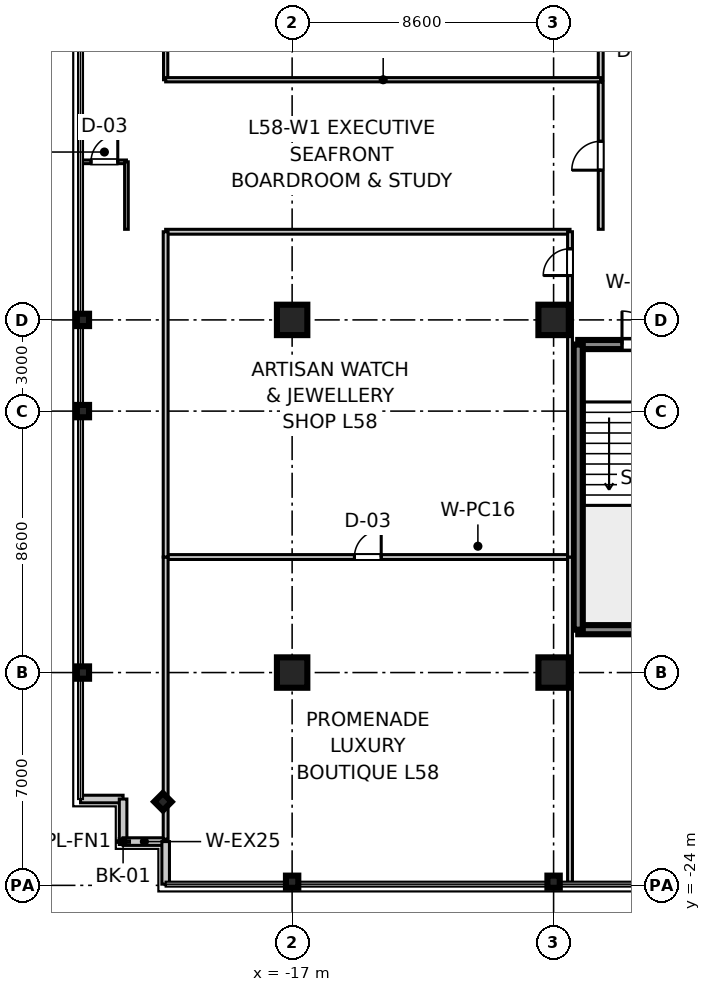
"""IFC4 building model, lengths in metres.
Left out: names, types, materials, properties, quantities, classifications, styles, units other than length and angle.
Written with IfcOpenShell. Run it as: python <this file> out.ifc"""

import sys

from ifc_helpers import new_model, si_unit, direction, frame, frame_2d, origin, origin_2d, place, context, subcontext, project, spatial, rectangle, i_section, extrude, source, transform, mapped, element, fill, save


model = new_model("IFC4")
c1 = context("Model", 3, precision=1e-05, world=origin(), true_north=direction((0.0, 1.0)))
c2 = subcontext(c1, "Body", "Model", "MODEL_VIEW")
j1 = project(units=[si_unit("LENGTHUNIT", "METRE"), si_unit("PLANEANGLEUNIT", "RADIAN")], contexts=[c1])
p1 = place(None, origin())
s1 = spatial("IfcSite", under=j1, at=p1, CompositionType="ELEMENT")
p2 = place(p1, origin())
s2 = spatial("IfcBuilding", under=s1, at=p2, CompositionType="ELEMENT")
p3 = place(p2, frame((0.0, 0.0, 227.1)))
s3 = spatial("IfcBuildingStorey", under=s2, at=p3, CompositionType="ELEMENT", Elevation=227.1)
m1 = source(origin(), c2, "Body", "SweptSolid", [
    extrude(rectangle(XDim=1.0, YDim=1.0, at=origin_2d()), origin(), (0.0, 0.0, 1.0), 3.655),
])
for number, where, z_axis, x_axis in (
    (1, (-17.0, -17.0, 0.0), (0.0, 0.0, 1.0), (1.0, 0.0, 0.0)),
    (2, (-17.0, -5.4, 0.0), (0.0, 0.0, 1.0), (1.0, 0.0, 0.0)),
    (3, (-8.4, -17.0, 0.0), (0.0, 0.0, 1.0), (1.0, 0.0, 0.0)),
    (4, (-8.4, -5.4, 0.0), (0.0, 0.0, 1.0), (1.0, 0.0, 0.0)),
):
    element("IfcColumn", number, at=place(p3, frame(where, z_axis=z_axis, x_axis=x_axis)), inside=s3, PredefinedType="COLUMN", context=c2, shape_type="MappedRepresentation", body=[
        mapped(m1, transform((0.0, 0.0, 0.0), scale=1.0)),
    ])
m2 = source(origin(), c2, "Body", "SweptSolid", [
    extrude(i_section(OverallWidth=0.401, OverallDepth=0.406, WebThickness=0.016, FlangeThickness=0.025, at=origin_2d()), origin(), (0.0, 0.0, 1.0), 3.655),
])
for number, where, z_axis, x_axis in (
    (5, (-23.88, -17.0, 0.0), (0.0, 0.0, 1.0), (1.0, 0.0, 0.0)),
    (6, (-23.88, -8.4, 0.0), (0.0, 0.0, 1.0), (1.0, 0.0, 0.0)),
    (7, (-23.88, -5.4, 0.0), (0.0, 0.0, 1.0), (1.0, 0.0, 0.0)),
    (8, (-17.0, -23.88, 0.0), (0.0, 0.0, 1.0), (0.0, 1.0, 0.0)),
    (9, (-8.4, -23.88, 0.0), (0.0, 0.0, 1.0), (0.0, 1.0, 0.0)),
    (10, (-21.25, -21.25, 0.0), (0.0, 0.0, 1.0), (0.707, 0.707, 0.0)),
):
    element("IfcColumn", number, at=place(p3, frame(where, z_axis=z_axis, x_axis=x_axis)), inside=s3, PredefinedType="COLUMN", context=c2, shape_type="MappedRepresentation", body=[
        mapped(m2, transform((0.0, 0.0, 0.0), scale=1.0)),
    ])
m3 = source(origin(), c2, "Body", "SweptSolid", [
    extrude(rectangle(XDim=3.98, YDim=0.3, at=frame_2d((1.99, 0.0))), origin(), (0.0, 0.0, 1.0), 3.41),
])
p4 = place(p3, frame((-7.59, -15.59, 0.0), z_axis=(0.0, 0.0, 1.0), x_axis=(1.0, 0.0, 0.0)))
e11 = element("IfcWall", 11, at=p4, inside=s3, PredefinedType="SHEAR", context=c2, shape_type="MappedRepresentation", body=[
    mapped(m3, transform((0.0, 0.0, 0.0), scale=1.0)),
])
p5 = place(p3, frame((-7.59, -6.21, 0.0), z_axis=(0.0, 0.0, 1.0), x_axis=(1.0, 0.0, 0.0)))
e12 = element("IfcWall", 12, at=p5, inside=s3, PredefinedType="SHEAR", context=c2, shape_type="MappedRepresentation", body=[
    mapped(m3, transform((0.0, 0.0, 0.0), scale=1.0)),
])
p6 = place(p5, frame((1.44, 0.0, 0.0)))
e13 = element("IfcOpeningElement", 13, at=p6, cuts=e12, PredefinedType="OPENING", context=c2, shape_type="SweptSolid", body=[
    extrude(rectangle(XDim=1.1, YDim=2.15, at=frame_2d((0.55, 1.075))), frame((0.0, 0.16, 0.0), z_axis=(0.0, -1.0, 0.0), x_axis=(1.0, 0.0, 0.0)), (0.0, 0.0, 1.0), 0.32),
])
m4 = source(origin(), c2, "Body", "SweptSolid", [
    extrude(rectangle(XDim=9.38, YDim=0.3, at=frame_2d((4.69, 0.0))), origin(), (0.0, 0.0, 1.0), 3.41),
])
p7 = place(p3, frame((-7.59, -15.59, 0.0), z_axis=(0.0, 0.0, 1.0), x_axis=(0.0, 1.0, 0.0)))
e14 = element("IfcWall", 14, at=p7, inside=s3, PredefinedType="SHEAR", context=c2, shape_type="MappedRepresentation", body=[
    mapped(m4, transform((0.0, 0.0, 0.0), scale=1.0)),
])
m5 = source(origin(), c2, "Body", "SweptSolid", [
    extrude(rectangle(XDim=1.4, YDim=0.25, at=frame_2d((0.7, 0.0))), origin(), (0.0, 0.0, 1.0), 3.41),
])
p8 = place(p3, frame((-23.96, -21.16, 0.0), z_axis=(0.0, 0.0, 1.0), x_axis=(1.0, 0.0, 0.0)))
e15 = element("IfcWall", 15, at=p8, inside=s3, PredefinedType="STANDARD", context=c2, shape_type="MappedRepresentation", body=[
    mapped(m5, transform((0.0, 0.0, 0.0), scale=1.0)),
])
m6 = source(origin(), c2, "Body", "SweptSolid", [
    extrude(rectangle(XDim=1.4, YDim=0.25, at=frame_2d((0.7, 0.0))), origin(), (0.0, 0.0, 1.0), 3.41),
])
for number, where, z_axis, x_axis in (
    (16, (-22.56, -22.56, 0.0), (0.0, 0.0, 1.0), (0.0, 1.0, 0.0)),
    (17, (-22.56, -22.56, 0.0), (0.0, 0.0, 1.0), (1.0, 0.0, 0.0)),
):
    element("IfcWall", number, at=place(p3, frame(where, z_axis=z_axis, x_axis=x_axis)), inside=s3, PredefinedType="STANDARD", context=c2, shape_type="MappedRepresentation", body=[
        mapped(m6, transform((0.0, 0.0, 0.0), scale=1.0)),
    ])
p9 = place(p3, frame((-21.16, -23.96, 0.0), z_axis=(0.0, 0.0, 1.0), x_axis=(0.0, 1.0, 0.0)))
e18 = element("IfcWall", 18, at=p9, inside=s3, PredefinedType="STANDARD", context=c2, shape_type="MappedRepresentation", body=[
    mapped(m5, transform((0.0, 0.0, 0.0), scale=1.0)),
])
m7 = source(origin(), c2, "Body", "SweptSolid", [
    extrude(rectangle(XDim=21.4, YDim=0.16, at=frame_2d((10.7, 0.0))), origin(), (0.0, 0.0, 1.0), 2.75),
])
p10 = place(p3, frame((-6.85, 2.5, 0.0), z_axis=(0.0, 0.0, 1.0), x_axis=(0.0, 1.0, 0.0)))
e19 = element("IfcWall", 19, at=p10, inside=s3, PredefinedType="PARTITIONING", context=c2, shape_type="MappedRepresentation", body=[
    mapped(m7, transform((0.0, 0.0, 0.0), scale=1.0)),
])
p11 = place(p10, frame((8.15, 0.0, 0.0)))
e20 = element("IfcOpeningElement", 20, at=p11, cuts=e19, PredefinedType="OPENING", context=c2, shape_type="SweptSolid", body=[
    extrude(rectangle(XDim=0.95, YDim=2.1, at=frame_2d((0.475, 1.05))), frame((0.0, 0.09, 0.0), z_axis=(0.0, -1.0, 0.0), x_axis=(1.0, 0.0, 0.0)), (0.0, 0.0, 1.0), 0.18),
])
m8 = source(origin(), c2, "Body", "SweptSolid", [
    extrude(rectangle(XDim=19.98, YDim=0.14, at=frame_2d((9.99, 0.0))), origin(), (0.0, 0.0, 1.0), 2.75),
])
p12 = place(p3, frame((-21.16, 2.5, 0.0), z_axis=(0.0, 0.0, 1.0), x_axis=(0.0, 1.0, 0.0)))
e21 = element("IfcWall", 21, at=p12, inside=s3, PredefinedType="PARTITIONING", context=c2, shape_type="MappedRepresentation", body=[
    mapped(m8, transform((0.0, 0.0, 0.0), scale=1.0)),
])
m9 = source(origin(), c2, "Body", "SweptSolid", [
    extrude(rectangle(XDim=14.31, YDim=0.14, at=frame_2d((7.155, 0.0))), origin(), (0.0, 0.0, 1.0), 2.75),
])
p13 = place(p3, frame((-21.16, 2.5, 0.0), z_axis=(0.0, 0.0, 1.0), x_axis=(1.0, 0.0, 0.0)))
e22 = element("IfcWall", 22, at=p13, inside=s3, PredefinedType="PARTITIONING", context=c2, shape_type="MappedRepresentation", body=[
    mapped(m9, transform((0.0, 0.0, 0.0), scale=1.0)),
])
m10 = source(origin(), c2, "Body", "SweptSolid", [
    extrude(rectangle(XDim=13.3, YDim=0.16, at=frame_2d((6.65, 0.0))), origin(), (0.0, 0.0, 1.0), 2.75),
])
p14 = place(p3, frame((-21.16, -13.2, 0.0), z_axis=(0.0, 0.0, 1.0), x_axis=(1.0, 0.0, 0.0)))
e23 = element("IfcWall", 23, at=p14, inside=s3, PredefinedType="PARTITIONING", context=c2, shape_type="MappedRepresentation", body=[
    mapped(m10, transform((0.0, 0.0, 0.0), scale=1.0)),
])
p15 = place(p14, frame((6.21, 0.0, 0.0)))
e24 = element("IfcOpeningElement", 24, at=p15, cuts=e23, PredefinedType="OPENING", context=c2, shape_type="SweptSolid", body=[
    extrude(rectangle(XDim=0.88, YDim=2.1, at=frame_2d((0.44, 1.05))), frame((0.0, 0.09, 0.0), z_axis=(0.0, -1.0, 0.0), x_axis=(1.0, 0.0, 0.0)), (0.0, 0.0, 1.0), 0.18),
])
m11 = source(origin(), c2, "Body", "SweptSolid", [
    extrude(rectangle(XDim=9.28, YDim=0.16, at=frame_2d((4.64, 0.0))), origin(), (0.0, 0.0, 1.0), 2.75),
])
p16 = place(p3, frame((-21.16, -22.48, 0.0), z_axis=(0.0, 0.0, 1.0), x_axis=(0.0, 1.0, 0.0)))
e25 = element("IfcWall", 25, at=p16, inside=s3, PredefinedType="PARTITIONING", context=c2, shape_type="MappedRepresentation", body=[
    mapped(m11, transform((0.0, 0.0, 0.0), scale=1.0)),
])
m12 = source(origin(), c2, "Body", "SweptSolid", [
    extrude(rectangle(XDim=10.7, YDim=0.16, at=frame_2d((5.35, 0.0))), origin(), (0.0, 0.0, 1.0), 2.75),
])
p17 = place(p3, frame((-7.86, -23.9, 0.0), z_axis=(0.0, 0.0, 1.0), x_axis=(0.0, 1.0, 0.0)))
e26 = element("IfcWall", 26, at=p17, inside=s3, PredefinedType="PARTITIONING", context=c2, shape_type="MappedRepresentation", body=[
    mapped(m12, transform((0.0, 0.0, 0.0), scale=1.0)),
])
p18 = place(p3, frame((-21.16, -2.5, 0.0), z_axis=(0.0, 0.0, 1.0), x_axis=(1.0, 0.0, 0.0)))
e27 = element("IfcWall", 27, at=p18, inside=s3, PredefinedType="PARTITIONING", context=c2, shape_type="MappedRepresentation", body=[
    mapped(m10, transform((0.0, 0.0, 0.0), scale=1.0)),
])
p19 = place(p3, frame((-21.16, -13.2, 0.0), z_axis=(0.0, 0.0, 1.0), x_axis=(0.0, 1.0, 0.0)))
e28 = element("IfcWall", 28, at=p19, inside=s3, PredefinedType="PARTITIONING", context=c2, shape_type="MappedRepresentation", body=[
    mapped(m12, transform((0.0, 0.0, 0.0), scale=1.0)),
])
p20 = place(p3, frame((-7.86, -13.2, 0.0), z_axis=(0.0, 0.0, 1.0), x_axis=(0.0, 1.0, 0.0)))
e29 = element("IfcWall", 29, at=p20, inside=s3, PredefinedType="PARTITIONING", context=c2, shape_type="MappedRepresentation", body=[
    mapped(m12, transform((0.0, 0.0, 0.0), scale=1.0)),
])
p21 = place(p20, frame((9.26, 0.0, 0.0)))
e30 = element("IfcOpeningElement", 30, at=p21, cuts=e29, PredefinedType="OPENING", context=c2, shape_type="SweptSolid", body=[
    extrude(rectangle(XDim=0.88, YDim=2.1, at=frame_2d((0.44, 1.05))), frame((0.0, 0.09, 0.0), z_axis=(0.0, -1.0, 0.0), x_axis=(1.0, 0.0, 0.0)), (0.0, 0.0, 1.0), 0.18),
])
m13 = source(origin(), c2, "Body", "SweptSolid", [
    extrude(rectangle(XDim=4.84, YDim=0.16, at=frame_2d((2.42, 0.0))), origin(), (0.0, 0.0, 1.0), 2.75),
])
p22 = place(p3, frame((-6.85, -2.42, 0.0), z_axis=(0.0, 0.0, 1.0), x_axis=(0.0, 1.0, 0.0)))
e31 = element("IfcWall", 31, at=p22, inside=s3, PredefinedType="PARTITIONING", context=c2, shape_type="MappedRepresentation", body=[
    mapped(m13, transform((0.0, 0.0, 0.0), scale=1.0)),
])
p23 = place(p22, frame((1.945, 0.0, 0.0)))
e32 = element("IfcOpeningElement", 32, at=p23, cuts=e31, PredefinedType="OPENING", context=c2, shape_type="SweptSolid", body=[
    extrude(rectangle(XDim=0.95, YDim=2.1, at=frame_2d((0.475, 1.05))), frame((0.0, 0.09, 0.0), z_axis=(0.0, -1.0, 0.0), x_axis=(1.0, 0.0, 0.0)), (0.0, 0.0, 1.0), 0.18),
])
m14 = source(origin(), c2, "Body", "SweptSolid", [
    extrude(rectangle(XDim=1.45, YDim=0.12, at=frame_2d((0.725, 0.0))), origin(), (0.0, 0.0, 1.0), 2.75),
])
p24 = place(p3, frame((-23.9, -0.2, 0.0), z_axis=(0.0, 0.0, 1.0), x_axis=(1.0, 0.0, 0.0)))
e33 = element("IfcWall", 33, at=p24, inside=s3, PredefinedType="PARTITIONING", context=c2, shape_type="MappedRepresentation", body=[
    mapped(m14, transform((0.0, 0.0, 0.0), scale=1.0)),
])
p25 = place(p24, frame((0.285, 0.0, 0.0)))
e34 = element("IfcOpeningElement", 34, at=p25, cuts=e33, PredefinedType="OPENING", context=c2, shape_type="SweptSolid", body=[
    extrude(rectangle(XDim=0.88, YDim=2.1, at=frame_2d((0.44, 1.05))), frame((0.0, 0.07, 0.0), z_axis=(0.0, -1.0, 0.0), x_axis=(1.0, 0.0, 0.0)), (0.0, 0.0, 1.0), 0.14),
])
m15 = source(origin(), c2, "Body", "SweptSolid", [
    extrude(rectangle(XDim=2.22, YDim=0.12, at=frame_2d((1.11, 0.0))), origin(), (0.0, 0.0, 1.0), 2.75),
])
p26 = place(p3, frame((-22.45, -2.42, 0.0), z_axis=(0.0, 0.0, 1.0), x_axis=(0.0, 1.0, 0.0)))
e35 = element("IfcWall", 35, at=p26, inside=s3, PredefinedType="PARTITIONING", context=c2, shape_type="MappedRepresentation", body=[
    mapped(m15, transform((0.0, 0.0, 0.0), scale=1.0)),
])
m16 = source(origin(), c2, "Body", "SweptSolid", [
    extrude(rectangle(XDim=1.1, YDim=2.15, at=frame_2d((0.55, 1.075))), frame((0.0, 0.025, 0.0), z_axis=(0.0, -1.0, 0.0), x_axis=(1.0, 0.0, 0.0)), (0.0, 0.0, 1.0), 0.05),
])
p27 = place(p6, frame((1.1, 0.0, 0.0), z_axis=(0.0, 0.0, 1.0), x_axis=(-1.0, 0.0, 0.0)))
e36 = element("IfcDoor", 36, at=p27, inside=s3, OperationType="SINGLE_SWING_LEFT", PredefinedType="DOOR", context=c2, shape_type="MappedRepresentation", body=[
    mapped(m16, transform((0.0, 0.0, 0.0), scale=1.0)),
])
fill(e13, e36)
m17 = source(origin(), c2, "Body", "SweptSolid", [
    extrude(rectangle(XDim=0.88, YDim=2.1, at=frame_2d((0.44, 1.05))), frame((0.0, 0.025, 0.0), z_axis=(0.0, -1.0, 0.0), x_axis=(1.0, 0.0, 0.0)), (0.0, 0.0, 1.0), 0.05),
])
p28 = place(p15, frame((0.88, 0.0, 0.0), z_axis=(0.0, 0.0, 1.0), x_axis=(-1.0, 0.0, 0.0)))
e37 = element("IfcDoor", 37, at=p28, inside=s3, OperationType="SINGLE_SWING_RIGHT", PredefinedType="DOOR", context=c2, shape_type="MappedRepresentation", body=[
    mapped(m17, transform((0.0, 0.0, 0.0), scale=1.0)),
])
fill(e24, e37)
p29 = place(p21, origin())
e38 = element("IfcDoor", 38, at=p29, inside=s3, OperationType="SINGLE_SWING_LEFT", PredefinedType="DOOR", context=c2, shape_type="MappedRepresentation", body=[
    mapped(m17, transform((0.0, 0.0, 0.0), scale=1.0)),
])
fill(e30, e38)
p30 = place(p25, frame((0.88, 0.0, 0.0), z_axis=(0.0, 0.0, 1.0), x_axis=(-1.0, 0.0, 0.0)))
e39 = element("IfcDoor", 39, at=p30, inside=s3, OperationType="SINGLE_SWING_RIGHT", PredefinedType="DOOR", context=c2, shape_type="MappedRepresentation", body=[
    mapped(m17, transform((0.0, 0.0, 0.0), scale=1.0)),
])
fill(e34, e39)
m18 = source(origin(), c2, "Body", "SweptSolid", [
    extrude(rectangle(XDim=0.95, YDim=2.1, at=frame_2d((0.475, 1.05))), frame((0.0, 0.025, 0.0), z_axis=(0.0, -1.0, 0.0), x_axis=(1.0, 0.0, 0.0)), (0.0, 0.0, 1.0), 0.05),
])
p31 = place(p23, origin())
e40 = element("IfcDoor", 40, at=p31, inside=s3, OperationType="SINGLE_SWING_LEFT", PredefinedType="DOOR", context=c2, shape_type="MappedRepresentation", body=[
    mapped(m18, transform((0.0, 0.0, 0.0), scale=1.0)),
])
fill(e32, e40)
save(model, sys.argv[1])
